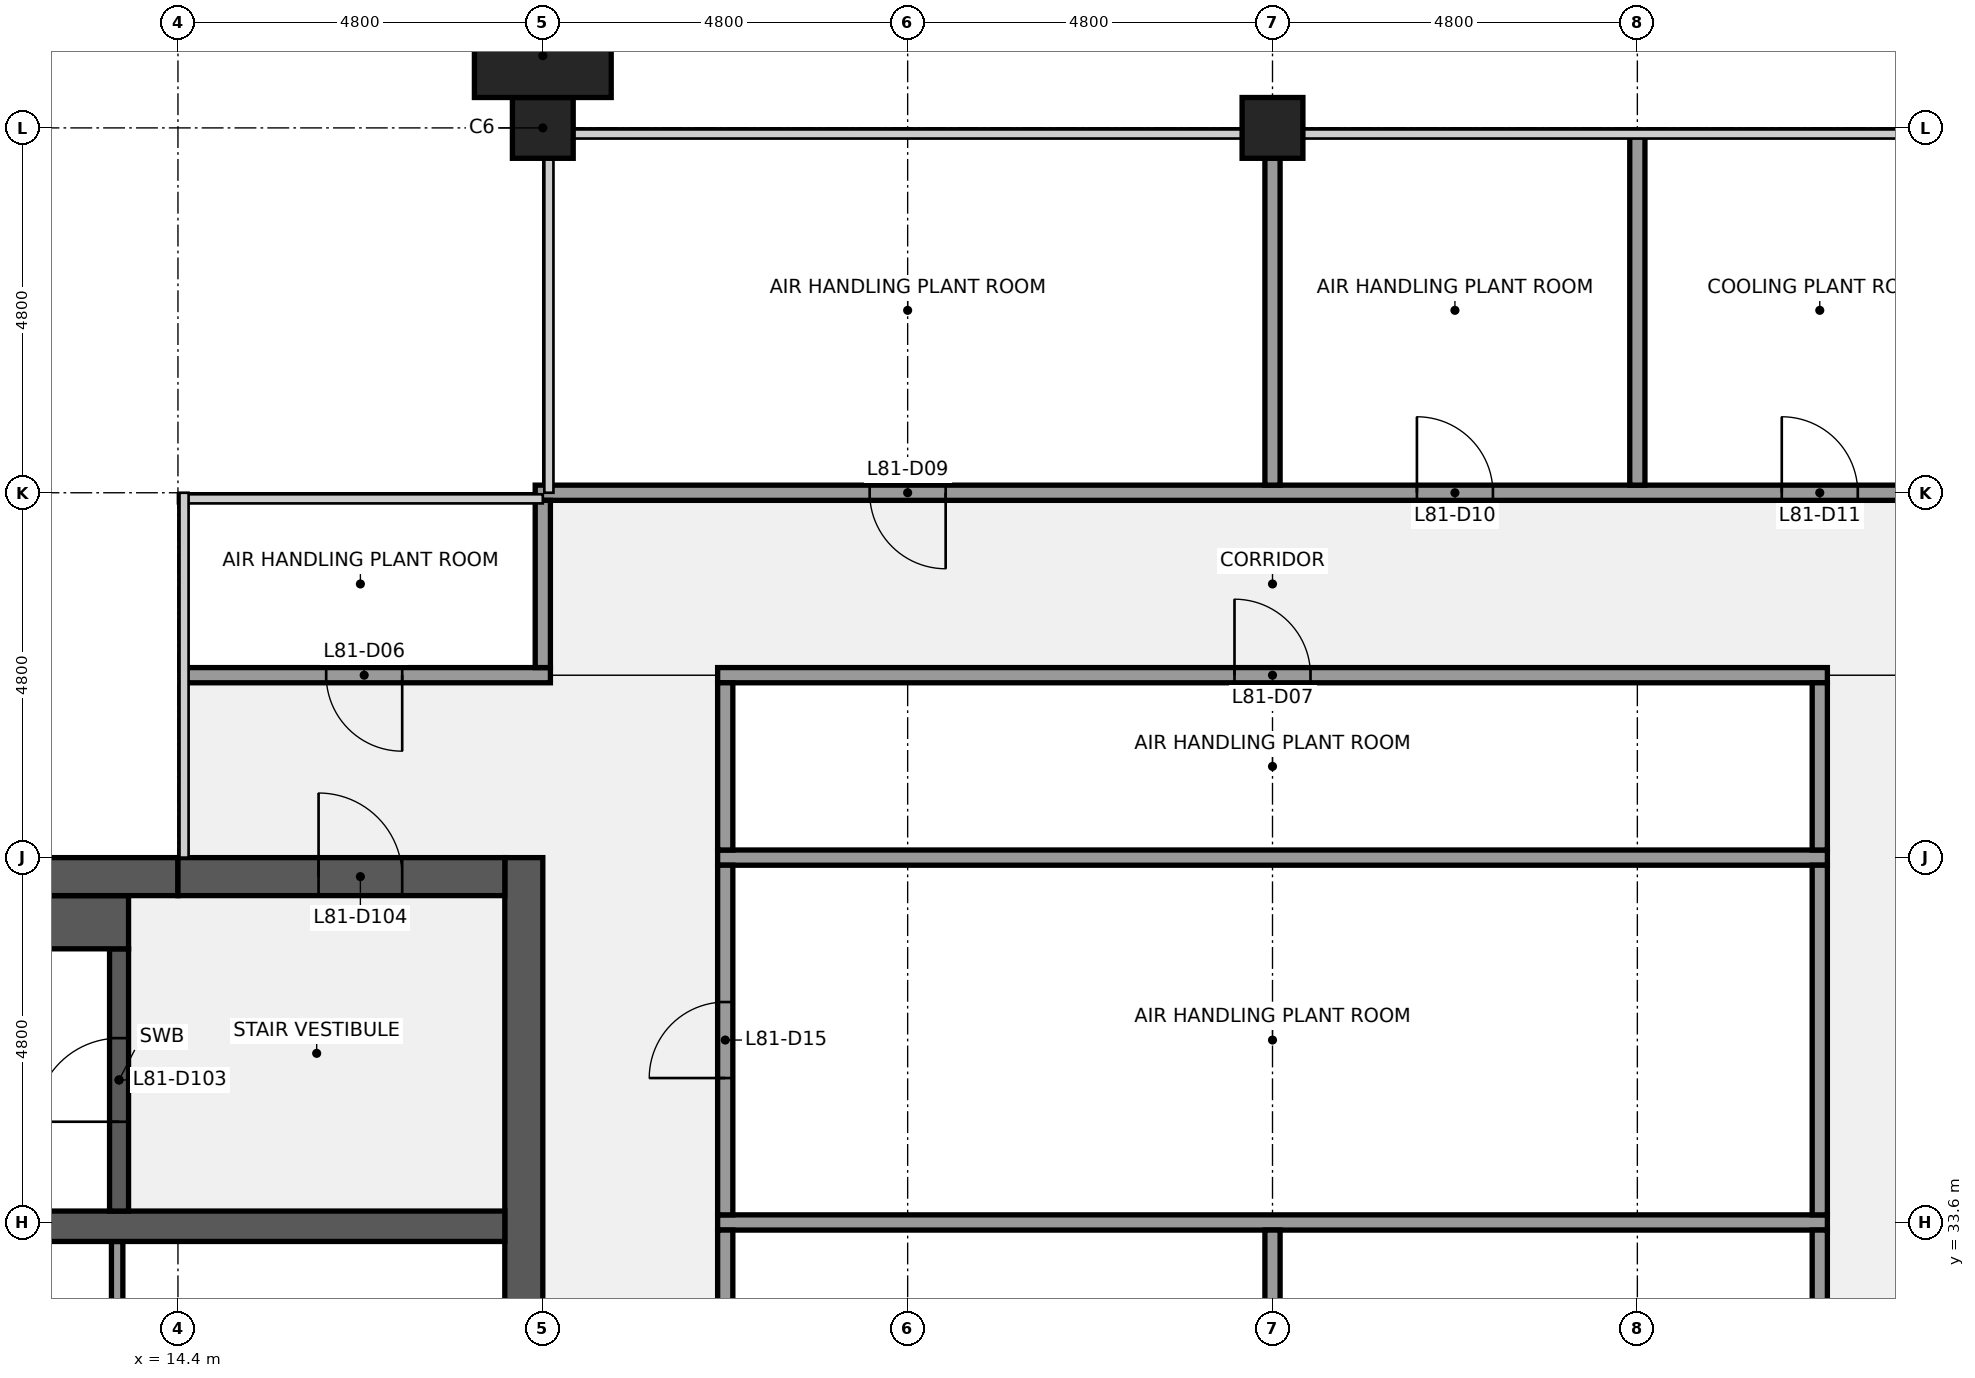
"""IFC4 building model, lengths in metres.
Left out: names, types, materials, properties, quantities, classifications, styles, units other than length and angle.
Written with IfcOpenShell. Run it as: python <this file> out.ifc"""

import sys

from ifc_helpers import new_model, si_unit, direction, frame, frame_2d, origin, origin_2d, place, context, subcontext, project, spatial, rectangle, extrude, element, fill, save


model = new_model("IFC4")
c1 = context("Model", 3, precision=1e-05, world=origin(), true_north=direction((0.0, 1.0)))
c2 = subcontext(c1, "Body", "Model", "MODEL_VIEW")
j1 = project(units=[si_unit("LENGTHUNIT", "METRE"), si_unit("PLANEANGLEUNIT", "RADIAN")], contexts=[c1])
p1 = place(None, origin())
s1 = spatial("IfcSite", under=j1, at=p1, CompositionType="ELEMENT")
p2 = place(p1, origin())
s2 = spatial("IfcBuilding", under=s1, at=p2, CompositionType="ELEMENT")
p3 = place(p2, frame((0.0, 0.0, 362.3)))
s3 = spatial("IfcBuildingStorey", under=s2, at=p3, CompositionType="ELEMENT", Elevation=362.3)
for number, where, z_axis, x_axis in (
    (1, (19.2, 48.0, 0.0), (0.0, 0.0, 1.0), (1.0, 0.0, 0.0)),
    (2, (28.8, 48.0, 0.0), (0.0, 0.0, 1.0), (1.0, 0.0, 0.0)),
):
    element("IfcColumn", number, at=place(p3, frame(where, z_axis=z_axis, x_axis=x_axis)), inside=s3, PredefinedType="COLUMN", context=c2, shape_type="SweptSolid", body=[
        extrude(rectangle(XDim=0.8, YDim=0.8, at=origin_2d()), origin(), (0.0, 0.0, 1.0), 4.0),
    ])
p4 = place(p3, frame((18.95, 38.4, 0.0), z_axis=(0.0, 0.0, 1.0), x_axis=(0.0, -1.0, 0.0)))
e3 = element("IfcWall", 3, at=p4, inside=s3, PredefinedType="SHEAR", context=c2, shape_type="SweptSolid", body=[
    extrude(rectangle(XDim=28.8, YDim=0.5, at=frame_2d((14.4, 0.0))), origin(), (0.0, 0.0, 1.0), 3.75),
])
p5 = place(p4, frame((18.3, 0.0, 0.0)))
e4 = element("IfcOpeningElement", 4, at=p5, cuts=e3, PredefinedType="OPENING", context=c2, shape_type="SweptSolid", body=[
    extrude(rectangle(XDim=1.8, YDim=2.1, at=frame_2d((0.9, 1.05))), frame((0.0, 0.26, 0.0), z_axis=(0.0, -1.0, 0.0), x_axis=(1.0, 0.0, 0.0)), (0.0, 0.0, 1.0), 0.52),
])
p6 = place(p4, frame((8.7, 0.0, 0.0)))
e5 = element("IfcOpeningElement", 5, at=p6, cuts=e3, PredefinedType="OPENING", context=c2, shape_type="SweptSolid", body=[
    extrude(rectangle(XDim=1.8, YDim=2.1, at=frame_2d((0.9, 1.05))), frame((0.0, 0.26, 0.0), z_axis=(0.0, -1.0, 0.0), x_axis=(1.0, 0.0, 0.0)), (0.0, 0.0, 1.0), 0.52),
])
p7 = place(p3, frame((13.6, 30.75, 0.0), z_axis=(0.0, 0.0, 1.0), x_axis=(0.0, 1.0, 0.0)))
e6 = element("IfcWall", 6, at=p7, inside=s3, PredefinedType="PARTITIONING", context=c2, shape_type="SweptSolid", body=[
    extrude(rectangle(XDim=2.6, YDim=0.15, at=frame_2d((1.3, 0.0))), origin(), (0.0, 0.0, 1.0), 3.75),
])
p8 = place(p3, frame((0.5, 33.55, 0.0), z_axis=(0.0, 0.0, 1.0), x_axis=(1.0, 0.0, 0.0)))
e7 = element("IfcWall", 7, at=p8, inside=s3, PredefinedType="SHEAR", context=c2, shape_type="SweptSolid", body=[
    extrude(rectangle(XDim=18.2, YDim=0.4, at=frame_2d((9.1, 0.0))), origin(), (0.0, 0.0, 1.0), 3.75),
])
p9 = place(p3, frame((13.625, 33.75, 0.0), z_axis=(0.0, 0.0, 1.0), x_axis=(0.0, 1.0, 0.0)))
e8 = element("IfcWall", 8, at=p9, inside=s3, PredefinedType="SHEAR", context=c2, shape_type="SweptSolid", body=[
    extrude(rectangle(XDim=3.45, YDim=0.25, at=frame_2d((1.725, 0.0))), origin(), (0.0, 0.0, 1.0), 3.75),
])
p10 = place(p9, frame((1.175, 0.0, 0.0)))
e9 = element("IfcOpeningElement", 9, at=p10, cuts=e8, PredefinedType="OPENING", context=c2, shape_type="SweptSolid", body=[
    extrude(rectangle(XDim=1.1, YDim=2.1, at=frame_2d((0.55, 1.05))), frame((0.0, 0.135, 0.0), z_axis=(0.0, -1.0, 0.0), x_axis=(1.0, 0.0, 0.0)), (0.0, 0.0, 1.0), 0.27),
])
p11 = place(p3, frame((6.25, 37.55, 0.0), z_axis=(0.0, 0.0, 1.0), x_axis=(1.0, 0.0, 0.0)))
e10 = element("IfcWall", 10, at=p11, inside=s3, PredefinedType="SHEAR", context=c2, shape_type="SweptSolid", body=[
    extrude(rectangle(XDim=7.5, YDim=0.7, at=frame_2d((3.75, 0.0))), origin(), (0.0, 0.0, 1.0), 3.75),
])
p12 = place(p3, frame((0.5, 38.15, 0.0), z_axis=(0.0, 0.0, 1.0), x_axis=(1.0, 0.0, 0.0)))
e11 = element("IfcWall", 11, at=p12, inside=s3, PredefinedType="SHEAR", context=c2, shape_type="SweptSolid", body=[
    extrude(rectangle(XDim=13.9, YDim=0.5, at=frame_2d((6.95, 0.0))), origin(), (0.0, 0.0, 1.0), 3.75),
])
p13 = place(p3, frame((14.4, 38.15, 0.0), z_axis=(0.0, 0.0, 1.0), x_axis=(1.0, 0.0, 0.0)))
e12 = element("IfcWall", 12, at=p13, inside=s3, PredefinedType="SHEAR", context=c2, shape_type="SweptSolid", body=[
    extrude(rectangle(XDim=4.3, YDim=0.5, at=frame_2d((2.15, 0.0))), origin(), (0.0, 0.0, 1.0), 3.75),
])
p14 = place(p13, frame((1.85, 0.0, 0.0)))
e13 = element("IfcOpeningElement", 13, at=p14, cuts=e12, PredefinedType="OPENING", context=c2, shape_type="SweptSolid", body=[
    extrude(rectangle(XDim=1.1, YDim=2.1, at=frame_2d((0.55, 1.05))), frame((0.0, 0.26, 0.0), z_axis=(0.0, -1.0, 0.0), x_axis=(1.0, 0.0, 0.0)), (0.0, 0.0, 1.0), 0.52),
])
for number, where, z_axis, x_axis in (
    (14, (21.5, 33.6, 0.0), (0.0, 0.0, 1.0), (1.0, 0.0, 0.0)),
    (15, (21.5, 38.4, 0.0), (0.0, 0.0, 1.0), (1.0, 0.0, 0.0)),
):
    element("IfcWall", number, at=place(p3, frame(where, z_axis=z_axis, x_axis=x_axis)), inside=s3, PredefinedType="PARTITIONING", context=c2, shape_type="SweptSolid", body=[
        extrude(rectangle(XDim=14.6, YDim=0.2, at=frame_2d((7.3, 0.0))), origin(), (0.0, 0.0, 1.0), 2.759),
    ])
p15 = place(p3, frame((14.5, 40.8, 0.0), z_axis=(0.0, 0.0, 1.0), x_axis=(1.0, 0.0, 0.0)))
e16 = element("IfcWall", 16, at=p15, inside=s3, PredefinedType="PARTITIONING", context=c2, shape_type="SweptSolid", body=[
    extrude(rectangle(XDim=4.8, YDim=0.2, at=frame_2d((2.4, 0.0))), origin(), (0.0, 0.0, 1.0), 2.759),
])
p16 = place(p15, frame((1.85, 0.0, 0.0)))
e17 = element("IfcOpeningElement", 17, at=p16, cuts=e16, PredefinedType="OPENING", context=c2, shape_type="SweptSolid", body=[
    extrude(rectangle(XDim=1.0, YDim=2.1, at=frame_2d((0.5, 1.05))), frame((0.0, 0.11, 0.0), z_axis=(0.0, -1.0, 0.0), x_axis=(1.0, 0.0, 0.0)), (0.0, 0.0, 1.0), 0.22),
])
p17 = place(p3, frame((21.5, 40.8, 0.0), z_axis=(0.0, 0.0, 1.0), x_axis=(1.0, 0.0, 0.0)))
e18 = element("IfcWall", 18, at=p17, inside=s3, PredefinedType="PARTITIONING", context=c2, shape_type="SweptSolid", body=[
    extrude(rectangle(XDim=14.6, YDim=0.2, at=frame_2d((7.3, 0.0))), origin(), (0.0, 0.0, 1.0), 2.759),
])
p18 = place(p17, frame((6.8, 0.0, 0.0)))
e19 = element("IfcOpeningElement", 19, at=p18, cuts=e18, PredefinedType="OPENING", context=c2, shape_type="SweptSolid", body=[
    extrude(rectangle(XDim=1.0, YDim=2.1, at=frame_2d((0.5, 1.05))), frame((0.0, 0.11, 0.0), z_axis=(0.0, -1.0, 0.0), x_axis=(1.0, 0.0, 0.0)), (0.0, 0.0, 1.0), 0.22),
])
p19 = place(p3, frame((19.1, 43.2, 0.0), z_axis=(0.0, 0.0, 1.0), x_axis=(1.0, 0.0, 0.0)))
e20 = element("IfcWall", 20, at=p19, inside=s3, PredefinedType="PARTITIONING", context=c2, shape_type="SweptSolid", body=[
    extrude(rectangle(XDim=19.4, YDim=0.2, at=frame_2d((9.7, 0.0))), origin(), (0.0, 0.0, 1.0), 2.759),
])
p20 = place(p19, frame((4.4, 0.0, 0.0)))
e21 = element("IfcOpeningElement", 21, at=p20, cuts=e20, PredefinedType="OPENING", context=c2, shape_type="SweptSolid", body=[
    extrude(rectangle(XDim=1.0, YDim=2.1, at=frame_2d((0.5, 1.05))), frame((0.0, 0.11, 0.0), z_axis=(0.0, -1.0, 0.0), x_axis=(1.0, 0.0, 0.0)), (0.0, 0.0, 1.0), 0.22),
])
p21 = place(p19, frame((11.6, 0.0, 0.0)))
e22 = element("IfcOpeningElement", 22, at=p21, cuts=e20, PredefinedType="OPENING", context=c2, shape_type="SweptSolid", body=[
    extrude(rectangle(XDim=1.0, YDim=2.1, at=frame_2d((0.5, 1.05))), frame((0.0, 0.11, 0.0), z_axis=(0.0, -1.0, 0.0), x_axis=(1.0, 0.0, 0.0)), (0.0, 0.0, 1.0), 0.22),
])
p22 = place(p19, frame((16.4, 0.0, 0.0)))
e23 = element("IfcOpeningElement", 23, at=p22, cuts=e20, PredefinedType="OPENING", context=c2, shape_type="SweptSolid", body=[
    extrude(rectangle(XDim=1.0, YDim=2.1, at=frame_2d((0.5, 1.05))), frame((0.0, 0.11, 0.0), z_axis=(0.0, -1.0, 0.0), x_axis=(1.0, 0.0, 0.0)), (0.0, 0.0, 1.0), 0.22),
])
p23 = place(p3, frame((19.2, 40.9, 0.0), z_axis=(0.0, 0.0, 1.0), x_axis=(0.0, 1.0, 0.0)))
e24 = element("IfcWall", 24, at=p23, inside=s3, PredefinedType="PARTITIONING", context=c2, shape_type="SweptSolid", body=[
    extrude(rectangle(XDim=2.2, YDim=0.2, at=frame_2d((1.1, 0.0))), origin(), (0.0, 0.0, 1.0), 2.759),
])
p24 = place(p3, frame((21.6, 24.1, 0.0), z_axis=(0.0, 0.0, 1.0), x_axis=(0.0, 1.0, 0.0)))
e25 = element("IfcWall", 25, at=p24, inside=s3, PredefinedType="PARTITIONING", context=c2, shape_type="SweptSolid", body=[
    extrude(rectangle(XDim=9.4, YDim=0.2, at=frame_2d((4.7, 0.0))), origin(), (0.0, 0.0, 1.0), 2.759),
])
p25 = place(p24, frame((4.2, 0.0, 0.0)))
e26 = element("IfcOpeningElement", 26, at=p25, cuts=e25, PredefinedType="OPENING", context=c2, shape_type="SweptSolid", body=[
    extrude(rectangle(XDim=1.0, YDim=2.1, at=frame_2d((0.5, 1.05))), frame((0.0, 0.11, 0.0), z_axis=(0.0, -1.0, 0.0), x_axis=(1.0, 0.0, 0.0)), (0.0, 0.0, 1.0), 0.22),
])
p26 = place(p3, frame((21.6, 33.7, 0.0), z_axis=(0.0, 0.0, 1.0), x_axis=(0.0, 1.0, 0.0)))
e27 = element("IfcWall", 27, at=p26, inside=s3, PredefinedType="PARTITIONING", context=c2, shape_type="SweptSolid", body=[
    extrude(rectangle(XDim=4.6, YDim=0.2, at=frame_2d((2.3, 0.0))), origin(), (0.0, 0.0, 1.0), 2.759),
])
p27 = place(p26, frame((1.8, 0.0, 0.0)))
e28 = element("IfcOpeningElement", 28, at=p27, cuts=e27, PredefinedType="OPENING", context=c2, shape_type="SweptSolid", body=[
    extrude(rectangle(XDim=1.0, YDim=2.1, at=frame_2d((0.5, 1.05))), frame((0.0, 0.11, 0.0), z_axis=(0.0, -1.0, 0.0), x_axis=(1.0, 0.0, 0.0)), (0.0, 0.0, 1.0), 0.22),
])
p28 = place(p3, frame((21.6, 38.5, 0.0), z_axis=(0.0, 0.0, 1.0), x_axis=(0.0, 1.0, 0.0)))
e29 = element("IfcWall", 29, at=p28, inside=s3, PredefinedType="PARTITIONING", context=c2, shape_type="SweptSolid", body=[
    extrude(rectangle(XDim=2.2, YDim=0.2, at=frame_2d((1.1, 0.0))), origin(), (0.0, 0.0, 1.0), 2.759),
])
p29 = place(p3, frame((28.8, 24.1, 0.0), z_axis=(0.0, 0.0, 1.0), x_axis=(0.0, 1.0, 0.0)))
e30 = element("IfcWall", 30, at=p29, inside=s3, PredefinedType="PARTITIONING", context=c2, shape_type="SweptSolid", body=[
    extrude(rectangle(XDim=9.4, YDim=0.2, at=frame_2d((4.7, 0.0))), origin(), (0.0, 0.0, 1.0), 2.759),
])
p30 = place(p3, frame((28.8, 43.3, 0.0), z_axis=(0.0, 0.0, 1.0), x_axis=(0.0, 1.0, 0.0)))
e31 = element("IfcWall", 31, at=p30, inside=s3, PredefinedType="PARTITIONING", context=c2, shape_type="SweptSolid", body=[
    extrude(rectangle(XDim=4.3, YDim=0.2, at=frame_2d((2.15, 0.0))), origin(), (0.0, 0.0, 1.0), 2.759),
])
p31 = place(p3, frame((33.6, 43.3, 0.0), z_axis=(0.0, 0.0, 1.0), x_axis=(0.0, 1.0, 0.0)))
e32 = element("IfcWall", 32, at=p31, inside=s3, PredefinedType="PARTITIONING", context=c2, shape_type="SweptSolid", body=[
    extrude(rectangle(XDim=4.6, YDim=0.2, at=frame_2d((2.3, 0.0))), origin(), (0.0, 0.0, 1.0), 2.759),
])
p32 = place(p3, frame((36.0, 24.1, 0.0), z_axis=(0.0, 0.0, 1.0), x_axis=(0.0, 1.0, 0.0)))
e33 = element("IfcWall", 33, at=p32, inside=s3, PredefinedType="PARTITIONING", context=c2, shape_type="SweptSolid", body=[
    extrude(rectangle(XDim=9.4, YDim=0.2, at=frame_2d((4.7, 0.0))), origin(), (0.0, 0.0, 1.0), 2.759),
])
p33 = place(p32, frame((4.2, 0.0, 0.0)))
e34 = element("IfcOpeningElement", 34, at=p33, cuts=e33, PredefinedType="OPENING", context=c2, shape_type="SweptSolid", body=[
    extrude(rectangle(XDim=1.0, YDim=2.1, at=frame_2d((0.5, 1.05))), frame((0.0, 0.11, 0.0), z_axis=(0.0, -1.0, 0.0), x_axis=(1.0, 0.0, 0.0)), (0.0, 0.0, 1.0), 0.22),
])
p34 = place(p3, frame((36.0, 33.7, 0.0), z_axis=(0.0, 0.0, 1.0), x_axis=(0.0, 1.0, 0.0)))
e35 = element("IfcWall", 35, at=p34, inside=s3, PredefinedType="PARTITIONING", context=c2, shape_type="SweptSolid", body=[
    extrude(rectangle(XDim=4.6, YDim=0.2, at=frame_2d((2.3, 0.0))), origin(), (0.0, 0.0, 1.0), 2.759),
])
p35 = place(p3, frame((36.0, 38.5, 0.0), z_axis=(0.0, 0.0, 1.0), x_axis=(0.0, 1.0, 0.0)))
e36 = element("IfcWall", 36, at=p35, inside=s3, PredefinedType="PARTITIONING", context=c2, shape_type="SweptSolid", body=[
    extrude(rectangle(XDim=2.2, YDim=0.2, at=frame_2d((1.1, 0.0))), origin(), (0.0, 0.0, 1.0), 2.759),
])
p36 = place(p3, frame((19.2, 48.95, 0.0), z_axis=(0.0, 0.0, 1.0), x_axis=(1.0, 0.0, 0.0)))
e37 = element("IfcColumn", 37, at=p36, inside=s3, PredefinedType="PILASTER", context=c2, shape_type="SweptSolid", body=[
    extrude(rectangle(XDim=1.8, YDim=1.1, at=origin_2d()), origin(), (0.0, 0.0, 1.0), 4.0),
])
p37 = place(p10, origin())
e38 = element("IfcDoor", 38, at=p37, inside=s3, OperationType="SINGLE_SWING_LEFT", PredefinedType="DOOR", context=c2, shape_type="SweptSolid", body=[
    extrude(rectangle(XDim=1.1, YDim=2.1, at=frame_2d((0.55, 1.05))), frame((0.0, 0.025, 0.0), z_axis=(0.0, -1.0, 0.0), x_axis=(1.0, 0.0, 0.0)), (0.0, 0.0, 1.0), 0.05),
])
fill(e9, e38)
p38 = place(p14, origin())
e39 = element("IfcDoor", 39, at=p38, inside=s3, OperationType="SINGLE_SWING_LEFT", PredefinedType="DOOR", context=c2, shape_type="SweptSolid", body=[
    extrude(rectangle(XDim=1.1, YDim=2.1, at=frame_2d((0.55, 1.05))), frame((0.0, 0.025, 0.0), z_axis=(0.0, -1.0, 0.0), x_axis=(1.0, 0.0, 0.0)), (0.0, 0.0, 1.0), 0.05),
])
fill(e13, e39)
p39 = place(p16, origin())
e40 = element("IfcDoor", 40, at=p39, inside=s3, OperationType="SINGLE_SWING_RIGHT", PredefinedType="DOOR", context=c2, shape_type="SweptSolid", body=[
    extrude(rectangle(XDim=1.0, YDim=2.1, at=frame_2d((0.5, 1.05))), frame((0.0, 0.025, 0.0), z_axis=(0.0, -1.0, 0.0), x_axis=(1.0, 0.0, 0.0)), (0.0, 0.0, 1.0), 0.05),
])
fill(e17, e40)
p40 = place(p18, origin())
e41 = element("IfcDoor", 41, at=p40, inside=s3, OperationType="SINGLE_SWING_LEFT", PredefinedType="DOOR", context=c2, shape_type="SweptSolid", body=[
    extrude(rectangle(XDim=1.0, YDim=2.1, at=frame_2d((0.5, 1.05))), frame((0.0, 0.025, 0.0), z_axis=(0.0, -1.0, 0.0), x_axis=(1.0, 0.0, 0.0)), (0.0, 0.0, 1.0), 0.05),
])
fill(e19, e41)
p41 = place(p20, origin())
e42 = element("IfcDoor", 42, at=p41, inside=s3, OperationType="SINGLE_SWING_RIGHT", PredefinedType="DOOR", context=c2, shape_type="SweptSolid", body=[
    extrude(rectangle(XDim=1.0, YDim=2.1, at=frame_2d((0.5, 1.05))), frame((0.0, 0.025, 0.0), z_axis=(0.0, -1.0, 0.0), x_axis=(1.0, 0.0, 0.0)), (0.0, 0.0, 1.0), 0.05),
])
fill(e21, e42)
p42 = place(p21, origin())
e43 = element("IfcDoor", 43, at=p42, inside=s3, OperationType="SINGLE_SWING_LEFT", PredefinedType="DOOR", context=c2, shape_type="SweptSolid", body=[
    extrude(rectangle(XDim=1.0, YDim=2.1, at=frame_2d((0.5, 1.05))), frame((0.0, 0.025, 0.0), z_axis=(0.0, -1.0, 0.0), x_axis=(1.0, 0.0, 0.0)), (0.0, 0.0, 1.0), 0.05),
])
fill(e22, e43)
p43 = place(p22, origin())
e44 = element("IfcDoor", 44, at=p43, inside=s3, OperationType="SINGLE_SWING_LEFT", PredefinedType="DOOR", context=c2, shape_type="SweptSolid", body=[
    extrude(rectangle(XDim=1.0, YDim=2.1, at=frame_2d((0.5, 1.05))), frame((0.0, 0.025, 0.0), z_axis=(0.0, -1.0, 0.0), x_axis=(1.0, 0.0, 0.0)), (0.0, 0.0, 1.0), 0.05),
])
fill(e23, e44)
p44 = place(p27, origin())
e45 = element("IfcDoor", 45, at=p44, inside=s3, OperationType="SINGLE_SWING_LEFT", PredefinedType="DOOR", context=c2, shape_type="SweptSolid", body=[
    extrude(rectangle(XDim=1.0, YDim=2.1, at=frame_2d((0.5, 1.05))), frame((0.0, 0.025, 0.0), z_axis=(0.0, -1.0, 0.0), x_axis=(1.0, 0.0, 0.0)), (0.0, 0.0, 1.0), 0.05),
])
fill(e28, e45)
save(model, sys.argv[1])
